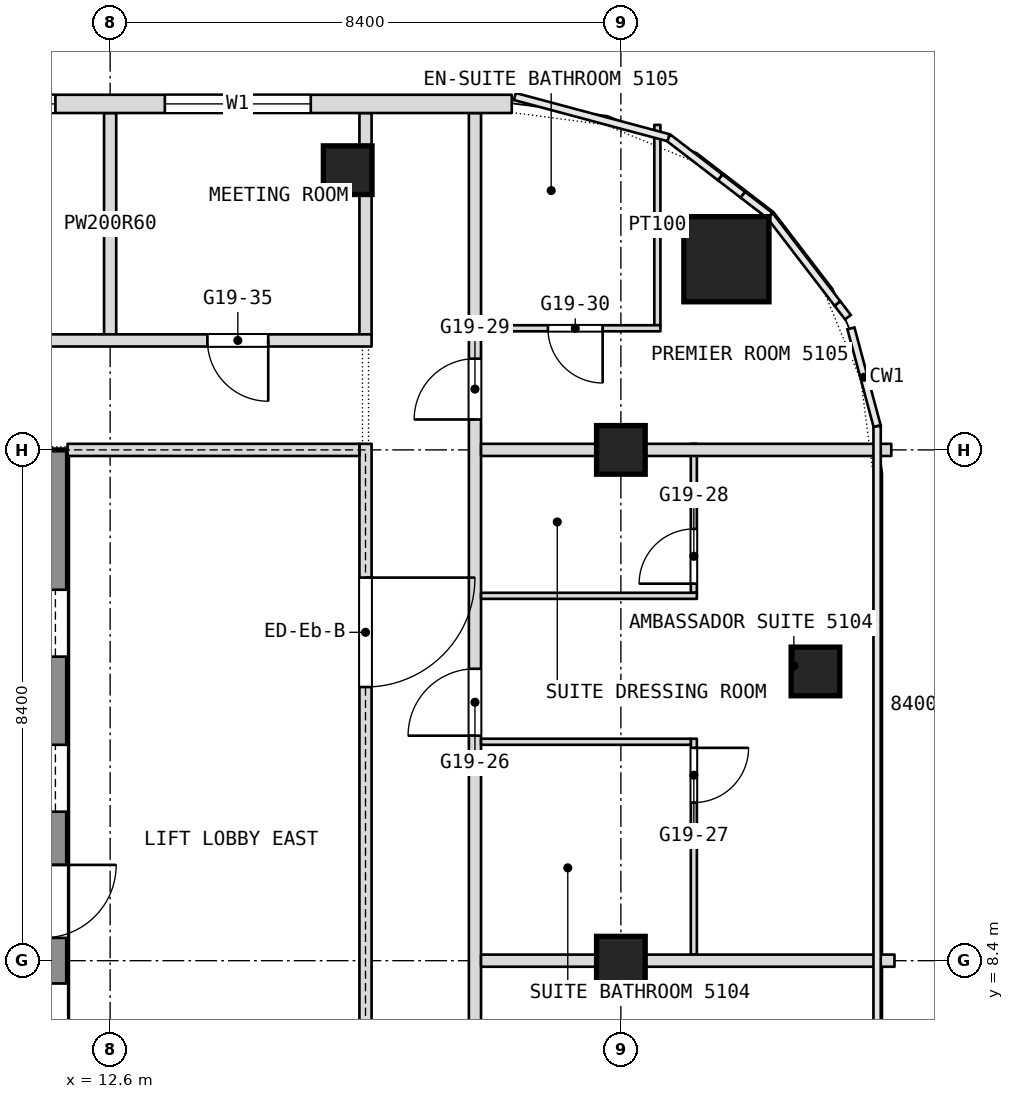
"""IFC4 building model, lengths in metres.
Left out: names, types, materials, properties, quantities, classifications, styles, units other than length and angle.
Written with IfcOpenShell. Run it as: python <this file> out.ifc"""

import sys

from ifc_helpers import new_model, si_unit, direction, frame, frame_2d, origin, origin_2d, place, context, subcontext, project, spatial, rectangle, extrude, element, fill, save


model = new_model("IFC4")
c1 = context("Model", 3, precision=1e-05, world=origin(), true_north=direction((0.0, 1.0)))
c2 = subcontext(c1, "Body", "Model", "MODEL_VIEW")
j1 = project(units=[si_unit("LENGTHUNIT", "METRE"), si_unit("PLANEANGLEUNIT", "RADIAN")], contexts=[c1])
p1 = place(None, origin())
s1 = spatial("IfcSite", under=j1, at=p1, CompositionType="ELEMENT")
p2 = place(p1, origin())
s2 = spatial("IfcBuilding", under=s1, at=p2, CompositionType="ELEMENT")
p3 = place(p2, frame((0.0, 0.0, 220.1)))
s3 = spatial("IfcBuildingStorey", under=s2, at=p3, CompositionType="ELEMENT", Elevation=220.1)
p4 = place(p3, frame((11.5, 0.0, 0.0), z_axis=(0.0, 0.0, 1.0), x_axis=(0.0, 1.0, 0.0)))
e1 = element("IfcWall", 1, at=p4, inside=s3, PredefinedType="SHEAR", context=c2, shape_type="SweptSolid", body=[
    extrude(rectangle(XDim=16.8, YDim=0.8, at=frame_2d((8.4, 0.0))), origin(), (0.0, 0.0, 1.0), 3.6),
])
p5 = place(p4, frame((2.3, 0.0, 0.0)))
e2 = element("IfcOpeningElement", 2, at=p5, cuts=e1, PredefinedType="OPENING", context=c2, shape_type="SweptSolid", body=[
    extrude(rectangle(XDim=1.1, YDim=2.1, at=frame_2d((0.55, 1.05))), frame((0.0, 0.4, 0.0), z_axis=(0.0, -1.0, 0.0), x_axis=(1.0, 0.0, 0.0)), (0.0, 0.0, 1.0), 0.8),
])
p6 = place(p4, frame((4.85, 0.0, 0.0)))
e3 = element("IfcOpeningElement", 3, at=p6, cuts=e1, PredefinedType="OPENING", context=c2, shape_type="SweptSolid", body=[
    extrude(rectangle(XDim=1.1, YDim=2.1, at=frame_2d((0.55, 1.05))), frame((0.0, 0.4, 0.0), z_axis=(0.0, -1.0, 0.0), x_axis=(1.0, 0.0, 0.0)), (0.0, 0.0, 1.0), 0.8),
])
p7 = place(p4, frame((6.825, 0.0, 0.0)))
e4 = element("IfcOpeningElement", 4, at=p7, cuts=e1, PredefinedType="OPENING", context=c2, shape_type="SweptSolid", body=[
    extrude(rectangle(XDim=1.2, YDim=2.1, at=frame_2d((0.6, 1.05))), frame((0.0, 0.4, 0.0), z_axis=(0.0, -1.0, 0.0), x_axis=(1.0, 0.0, 0.0)), (0.0, 0.0, 1.0), 0.8),
])
p8 = place(p4, frame((13.4, 0.0, 0.0)))
e5 = element("IfcOpeningElement", 5, at=p8, cuts=e1, PredefinedType="OPENING", context=c2, shape_type="SweptSolid", body=[
    extrude(rectangle(XDim=1.1, YDim=2.1, at=frame_2d((0.55, 1.05))), frame((0.0, 0.4, 0.0), z_axis=(0.0, -1.0, 0.0), x_axis=(1.0, 0.0, 0.0)), (0.0, 0.0, 1.0), 0.8),
])
p9 = place(p4, frame((10.85, 0.0, 0.0)))
e6 = element("IfcOpeningElement", 6, at=p9, cuts=e1, PredefinedType="OPENING", context=c2, shape_type="SweptSolid", body=[
    extrude(rectangle(XDim=1.1, YDim=2.1, at=frame_2d((0.55, 1.05))), frame((0.0, 0.4, 0.0), z_axis=(0.0, -1.0, 0.0), x_axis=(1.0, 0.0, 0.0)), (0.0, 0.0, 1.0), 0.8),
])
p10 = place(p4, frame((8.775, 0.0, 0.0)))
e7 = element("IfcOpeningElement", 7, at=p10, cuts=e1, PredefinedType="OPENING", context=c2, shape_type="SweptSolid", body=[
    extrude(rectangle(XDim=1.2, YDim=2.1, at=frame_2d((0.6, 1.05))), frame((0.0, 0.4, 0.0), z_axis=(0.0, -1.0, 0.0), x_axis=(1.0, 0.0, 0.0)), (0.0, 0.0, 1.0), 0.8),
])
p11 = place(p3, frame((22.736, 19.936, 0.0), z_axis=(0.0, 0.0, 1.0), x_axis=(1.0, 0.0, 0.0)))
e8 = element("IfcColumn", 8, at=p11, inside=s3, PredefinedType="COLUMN", context=c2, shape_type="SweptSolid", body=[
    extrude(rectangle(XDim=1.4, YDim=1.4, at=origin_2d()), origin(), (0.0, 0.0, 1.0), 3.6),
])
for number, where, z_axis, x_axis in (
    (9, (21.0, 8.4, 0.0), (0.0, 0.0, 1.0), (1.0, 0.0, 0.0)),
    (10, (21.0, 16.8, 0.0), (0.0, 0.0, 1.0), (1.0, 0.0, 0.0)),
    (11, (16.507, 21.4, 0.0), (0.0, 0.0, 1.0), (1.0, 0.0, 0.0)),
    (12, (24.2, 13.156, 0.0), (0.0, 0.0, 1.0), (1.0, 0.0, 0.0)),
):
    element("IfcColumn", number, at=place(p3, frame(where, z_axis=z_axis, x_axis=x_axis)), inside=s3, PredefinedType="COLUMN", context=c2, shape_type="SweptSolid", body=[
        extrude(rectangle(XDim=0.8, YDim=0.8, at=origin_2d()), origin(), (0.0, 0.0, 1.0), 3.6),
    ])
p12 = place(p3, frame((22.2, 8.5, 0.0), z_axis=(0.0, 0.0, 1.0), x_axis=(0.0, 1.0, 0.0)))
e13 = element("IfcWall", 13, at=p12, inside=s3, PredefinedType="PARTITIONING", context=c2, shape_type="SweptSolid", body=[
    extrude(rectangle(XDim=3.55, YDim=0.1, at=frame_2d((1.775, 0.0))), origin(), (0.0, 0.0, 1.0), 3.34),
])
p13 = place(p12, frame((2.5, 0.0, 0.0)))
e14 = element("IfcOpeningElement", 14, at=p13, cuts=e13, PredefinedType="OPENING", context=c2, shape_type="SweptSolid", body=[
    extrude(rectangle(XDim=0.9, YDim=2.1, at=frame_2d((0.45, 1.05))), frame((0.0, 0.05, 0.0), z_axis=(0.0, -1.0, 0.0), x_axis=(1.0, 0.0, 0.0)), (0.0, 0.0, 1.0), 0.1),
])
p14 = place(p3, frame((22.2, 14.45, 0.0), z_axis=(0.0, 0.0, 1.0), x_axis=(0.0, 1.0, 0.0)))
e15 = element("IfcWall", 15, at=p14, inside=s3, PredefinedType="PARTITIONING", context=c2, shape_type="SweptSolid", body=[
    extrude(rectangle(XDim=2.45, YDim=0.1, at=frame_2d((1.225, 0.0))), origin(), (0.0, 0.0, 1.0), 3.34),
])
p15 = place(p14, frame((0.15, 0.0, 0.0)))
e16 = element("IfcOpeningElement", 16, at=p15, cuts=e15, PredefinedType="OPENING", context=c2, shape_type="SweptSolid", body=[
    extrude(rectangle(XDim=0.9, YDim=2.1, at=frame_2d((0.45, 1.05))), frame((0.0, 0.05, 0.0), z_axis=(0.0, -1.0, 0.0), x_axis=(1.0, 0.0, 0.0)), (0.0, 0.0, 1.0), 0.1),
])
p16 = place(p3, frame((21.6, 18.85, 0.0), z_axis=(0.0, 0.0, 1.0), x_axis=(0.0, 1.0, 0.0)))
e17 = element("IfcWall", 17, at=p16, inside=s3, PredefinedType="PARTITIONING", context=c2, shape_type="SweptSolid", body=[
    extrude(rectangle(XDim=3.295, YDim=0.1, at=frame_2d((1.647, 0.0))), origin(), (0.0, 0.0, 1.0), 3.34),
])
p17 = place(p3, frame((18.6, -26.751, 0.0), z_axis=(0.0, 0.0, 1.0), x_axis=(0.0, 1.0, 0.0)))
e18 = element("IfcWall", 18, at=p17, inside=s3, PredefinedType="PARTITIONING", context=c2, shape_type="SweptSolid", body=[
    extrude(rectangle(XDim=49.091, YDim=0.2, at=frame_2d((24.545, 0.0))), origin(), (0.0, 0.0, 1.0), 3.34),
])
p18 = place(p17, frame((4.226, 0.0, 0.0)))
e19 = element("IfcOpeningElement", 19, at=p18, cuts=e18, PredefinedType="OPENING", context=c2, shape_type="SweptSolid", body=[
    extrude(rectangle(XDim=1.8, YDim=2.1, at=frame_2d((0.9, 1.05))), frame((0.0, 0.1, 0.0), z_axis=(0.0, -1.0, 0.0), x_axis=(1.0, 0.0, 0.0)), (0.0, 0.0, 1.0), 0.2),
])
p19 = place(p17, frame((10.351, 0.0, 0.0)))
e20 = element("IfcOpeningElement", 20, at=p19, cuts=e18, PredefinedType="OPENING", context=c2, shape_type="SweptSolid", body=[
    extrude(rectangle(XDim=1.0, YDim=2.1, at=frame_2d((0.5, 1.05))), frame((0.0, 0.1, 0.0), z_axis=(0.0, -1.0, 0.0), x_axis=(1.0, 0.0, 0.0)), (0.0, 0.0, 1.0), 0.2),
])
p20 = place(p17, frame((16.951, 0.0, 0.0)))
e21 = element("IfcOpeningElement", 21, at=p20, cuts=e18, PredefinedType="OPENING", context=c2, shape_type="SweptSolid", body=[
    extrude(rectangle(XDim=1.0, YDim=2.1, at=frame_2d((0.5, 1.05))), frame((0.0, 0.1, 0.0), z_axis=(0.0, -1.0, 0.0), x_axis=(1.0, 0.0, 0.0)), (0.0, 0.0, 1.0), 0.2),
])
p21 = place(p17, frame((22.051, 0.0, 0.0)))
e22 = element("IfcOpeningElement", 22, at=p21, cuts=e18, PredefinedType="OPENING", context=c2, shape_type="SweptSolid", body=[
    extrude(rectangle(XDim=1.1, YDim=2.1, at=frame_2d((0.55, 1.05))), frame((0.0, 0.1, 0.0), z_axis=(0.0, -1.0, 0.0), x_axis=(1.0, 0.0, 0.0)), (0.0, 0.0, 1.0), 0.2),
])
p22 = place(p17, frame((30.051, 0.0, 0.0)))
e23 = element("IfcOpeningElement", 23, at=p22, cuts=e18, PredefinedType="OPENING", context=c2, shape_type="SweptSolid", body=[
    extrude(rectangle(XDim=1.8, YDim=2.1, at=frame_2d((0.9, 1.05))), frame((0.0, 0.1, 0.0), z_axis=(0.0, -1.0, 0.0), x_axis=(1.0, 0.0, 0.0)), (0.0, 0.0, 1.0), 0.2),
])
p23 = place(p17, frame((38.851, 0.0, 0.0)))
e24 = element("IfcOpeningElement", 24, at=p23, cuts=e18, PredefinedType="OPENING", context=c2, shape_type="SweptSolid", body=[
    extrude(rectangle(XDim=1.1, YDim=2.1, at=frame_2d((0.55, 1.05))), frame((0.0, 0.1, 0.0), z_axis=(0.0, -1.0, 0.0), x_axis=(1.0, 0.0, 0.0)), (0.0, 0.0, 1.0), 0.2),
])
p24 = place(p17, frame((44.051, 0.0, 0.0)))
e25 = element("IfcOpeningElement", 25, at=p24, cuts=e18, PredefinedType="OPENING", context=c2, shape_type="SweptSolid", body=[
    extrude(rectangle(XDim=1.0, YDim=2.1, at=frame_2d((0.5, 1.05))), frame((0.0, 0.1, 0.0), z_axis=(0.0, -1.0, 0.0), x_axis=(1.0, 0.0, 0.0)), (0.0, 0.0, 1.0), 0.2),
])
for number, where, z_axis, x_axis in (
    (26, (16.8, 18.7, 0.0), (0.0, 0.0, 1.0), (0.0, 1.0, 0.0)),
    (27, (12.6, 18.7, 0.0), (0.0, 0.0, 1.0), (0.0, 1.0, 0.0)),
):
    element("IfcWall", number, at=place(p3, frame(where, z_axis=z_axis, x_axis=x_axis)), inside=s3, PredefinedType="PARTITIONING", context=c2, shape_type="SweptSolid", body=[
        extrude(rectangle(XDim=3.64, YDim=0.2, at=frame_2d((1.82, 0.0))), origin(), (0.0, 0.0, 1.0), 3.34),
    ])
p25 = place(p3, frame((18.7, 8.4, 0.0), z_axis=(0.0, 0.0, 1.0), x_axis=(1.0, 0.0, 0.0)))
e28 = element("IfcWall", 28, at=p25, inside=s3, PredefinedType="PARTITIONING", context=c2, shape_type="SweptSolid", body=[
    extrude(rectangle(XDim=6.8, YDim=0.2, at=frame_2d((3.4, 0.0))), origin(), (0.0, 0.0, 1.0), 2.94),
])
p26 = place(p3, frame((18.7, 12.0, 0.0), z_axis=(0.0, 0.0, 1.0), x_axis=(1.0, 0.0, 0.0)))
e29 = element("IfcWall", 29, at=p26, inside=s3, PredefinedType="PARTITIONING", context=c2, shape_type="SweptSolid", body=[
    extrude(rectangle(XDim=3.45, YDim=0.1, at=frame_2d((1.725, 0.0))), origin(), (0.0, 0.0, 1.0), 3.34),
])
p27 = place(p3, frame((18.7, 14.4, 0.0), z_axis=(0.0, 0.0, 1.0), x_axis=(1.0, 0.0, 0.0)))
e30 = element("IfcWall", 30, at=p27, inside=s3, PredefinedType="PARTITIONING", context=c2, shape_type="SweptSolid", body=[
    extrude(rectangle(XDim=3.55, YDim=0.1, at=frame_2d((1.775, 0.0))), origin(), (0.0, 0.0, 1.0), 3.34),
])
p28 = place(p3, frame((18.7, 16.8, 0.0), z_axis=(0.0, 0.0, 1.0), x_axis=(1.0, 0.0, 0.0)))
e31 = element("IfcWall", 31, at=p28, inside=s3, PredefinedType="PARTITIONING", context=c2, shape_type="SweptSolid", body=[
    extrude(rectangle(XDim=6.747, YDim=0.2, at=frame_2d((3.374, 0.0))), origin(), (0.0, 0.0, 1.0), 2.94),
])
p29 = place(p3, frame((-16.9, 18.6, 0.0), z_axis=(0.0, 0.0, 1.0), x_axis=(1.0, 0.0, 0.0)))
e32 = element("IfcWall", 32, at=p29, inside=s3, PredefinedType="PARTITIONING", context=c2, shape_type="SweptSolid", body=[
    extrude(rectangle(XDim=33.8, YDim=0.2, at=frame_2d((16.9, 0.0))), origin(), (0.0, 0.0, 1.0), 3.34),
])
p30 = place(p29, frame((1.7, 0.0, 0.0)))
e33 = element("IfcOpeningElement", 33, at=p30, cuts=e32, PredefinedType="OPENING", context=c2, shape_type="SweptSolid", body=[
    extrude(rectangle(XDim=1.0, YDim=2.1, at=frame_2d((0.5, 1.05))), frame((0.0, 0.1, 0.0), z_axis=(0.0, -1.0, 0.0), x_axis=(1.0, 0.0, 0.0)), (0.0, 0.0, 1.0), 0.2),
])
p31 = place(p29, frame((7.6, 0.0, 0.0)))
e34 = element("IfcOpeningElement", 34, at=p31, cuts=e32, PredefinedType="OPENING", context=c2, shape_type="SweptSolid", body=[
    extrude(rectangle(XDim=1.8, YDim=2.1, at=frame_2d((0.9, 1.05))), frame((0.0, 0.1, 0.0), z_axis=(0.0, -1.0, 0.0), x_axis=(1.0, 0.0, 0.0)), (0.0, 0.0, 1.0), 0.2),
])
p32 = place(p29, frame((16.0, 0.0, 0.0)))
e35 = element("IfcOpeningElement", 35, at=p32, cuts=e32, PredefinedType="OPENING", context=c2, shape_type="SweptSolid", body=[
    extrude(rectangle(XDim=1.8, YDim=2.1, at=frame_2d((0.9, 1.05))), frame((0.0, 0.1, 0.0), z_axis=(0.0, -1.0, 0.0), x_axis=(1.0, 0.0, 0.0)), (0.0, 0.0, 1.0), 0.2),
])
p33 = place(p29, frame((24.4, 0.0, 0.0)))
e36 = element("IfcOpeningElement", 36, at=p33, cuts=e32, PredefinedType="OPENING", context=c2, shape_type="SweptSolid", body=[
    extrude(rectangle(XDim=1.8, YDim=2.1, at=frame_2d((0.9, 1.05))), frame((0.0, 0.1, 0.0), z_axis=(0.0, -1.0, 0.0), x_axis=(1.0, 0.0, 0.0)), (0.0, 0.0, 1.0), 0.2),
])
p34 = place(p29, frame((31.1, 0.0, 0.0)))
e37 = element("IfcOpeningElement", 37, at=p34, cuts=e32, PredefinedType="OPENING", context=c2, shape_type="SweptSolid", body=[
    extrude(rectangle(XDim=1.0, YDim=2.1, at=frame_2d((0.5, 1.05))), frame((0.0, 0.1, 0.0), z_axis=(0.0, -1.0, 0.0), x_axis=(1.0, 0.0, 0.0)), (0.0, 0.0, 1.0), 0.2),
])
p35 = place(p3, frame((18.7, 18.8, 0.0), z_axis=(0.0, 0.0, 1.0), x_axis=(1.0, 0.0, 0.0)))
e38 = element("IfcWall", 38, at=p35, inside=s3, PredefinedType="PARTITIONING", context=c2, shape_type="SweptSolid", body=[
    extrude(rectangle(XDim=2.95, YDim=0.1, at=frame_2d((1.475, 0.0))), origin(), (0.0, 0.0, 1.0), 3.34),
])
p36 = place(p35, frame((1.1, 0.0, 0.0)))
e39 = element("IfcOpeningElement", 39, at=p36, cuts=e38, PredefinedType="OPENING", context=c2, shape_type="SweptSolid", body=[
    extrude(rectangle(XDim=0.9, YDim=2.1, at=frame_2d((0.45, 1.05))), frame((0.0, 0.05, 0.0), z_axis=(0.0, -1.0, 0.0), x_axis=(1.0, 0.0, 0.0)), (0.0, 0.0, 1.0), 0.1),
])
p37 = place(p3, frame((19.206, 22.49, 0.0), z_axis=(0.0, 0.0, 1.0), x_axis=(-1.0, 0.0, 0.0)))
e40 = element("IfcWall", 40, at=p37, inside=s3, PredefinedType="NOTDEFINED", context=c2, shape_type="SweptSolid", body=[
    extrude(rectangle(XDim=38.412, YDim=0.3, at=frame_2d((19.206, 0.0))), origin(), (0.0, 0.0, 1.0), 3.6),
])
p38 = place(p37, frame((3.306, 0.0, 0.9)))
e41 = element("IfcOpeningElement", 41, at=p38, cuts=e40, PredefinedType="OPENING", context=c2, shape_type="SweptSolid", body=[
    extrude(rectangle(XDim=2.4, YDim=2.1, at=frame_2d((1.2, 1.05))), frame((0.0, 0.15, 0.0), z_axis=(0.0, -1.0, 0.0), x_axis=(1.0, 0.0, 0.0)), (0.0, 0.0, 1.0), 0.3),
])
p39 = place(p37, frame((7.506, 0.0, 0.9)))
e42 = element("IfcOpeningElement", 42, at=p39, cuts=e40, PredefinedType="OPENING", context=c2, shape_type="SweptSolid", body=[
    extrude(rectangle(XDim=2.4, YDim=2.1, at=frame_2d((1.2, 1.05))), frame((0.0, 0.15, 0.0), z_axis=(0.0, -1.0, 0.0), x_axis=(1.0, 0.0, 0.0)), (0.0, 0.0, 1.0), 0.3),
])
p40 = place(p37, frame((11.706, 0.0, 0.9)))
e43 = element("IfcOpeningElement", 43, at=p40, cuts=e40, PredefinedType="OPENING", context=c2, shape_type="SweptSolid", body=[
    extrude(rectangle(XDim=2.4, YDim=2.1, at=frame_2d((1.2, 1.05))), frame((0.0, 0.15, 0.0), z_axis=(0.0, -1.0, 0.0), x_axis=(1.0, 0.0, 0.0)), (0.0, 0.0, 1.0), 0.3),
])
p41 = place(p37, frame((15.906, 0.0, 0.9)))
e44 = element("IfcOpeningElement", 44, at=p41, cuts=e40, PredefinedType="OPENING", context=c2, shape_type="SweptSolid", body=[
    extrude(rectangle(XDim=2.4, YDim=2.1, at=frame_2d((1.2, 1.05))), frame((0.0, 0.15, 0.0), z_axis=(0.0, -1.0, 0.0), x_axis=(1.0, 0.0, 0.0)), (0.0, 0.0, 1.0), 0.3),
])
p42 = place(p37, frame((20.106, 0.0, 0.9)))
e45 = element("IfcOpeningElement", 45, at=p42, cuts=e40, PredefinedType="OPENING", context=c2, shape_type="SweptSolid", body=[
    extrude(rectangle(XDim=2.4, YDim=2.1, at=frame_2d((1.2, 1.05))), frame((0.0, 0.15, 0.0), z_axis=(0.0, -1.0, 0.0), x_axis=(1.0, 0.0, 0.0)), (0.0, 0.0, 1.0), 0.3),
])
p43 = place(p37, frame((24.306, 0.0, 0.9)))
e46 = element("IfcOpeningElement", 46, at=p43, cuts=e40, PredefinedType="OPENING", context=c2, shape_type="SweptSolid", body=[
    extrude(rectangle(XDim=2.4, YDim=2.1, at=frame_2d((1.2, 1.05))), frame((0.0, 0.15, 0.0), z_axis=(0.0, -1.0, 0.0), x_axis=(1.0, 0.0, 0.0)), (0.0, 0.0, 1.0), 0.3),
])
p44 = place(p37, frame((28.506, 0.0, 0.9)))
e47 = element("IfcOpeningElement", 47, at=p44, cuts=e40, PredefinedType="OPENING", context=c2, shape_type="SweptSolid", body=[
    extrude(rectangle(XDim=2.4, YDim=2.1, at=frame_2d((1.2, 1.05))), frame((0.0, 0.15, 0.0), z_axis=(0.0, -1.0, 0.0), x_axis=(1.0, 0.0, 0.0)), (0.0, 0.0, 1.0), 0.3),
])
p45 = place(p37, frame((32.706, 0.0, 0.9)))
e48 = element("IfcOpeningElement", 48, at=p45, cuts=e40, PredefinedType="OPENING", context=c2, shape_type="SweptSolid", body=[
    extrude(rectangle(XDim=2.4, YDim=2.1, at=frame_2d((1.2, 1.05))), frame((0.0, 0.15, 0.0), z_axis=(0.0, -1.0, 0.0), x_axis=(1.0, 0.0, 0.0)), (0.0, 0.0, 1.0), 0.3),
])
p46 = place(p3, frame((16.8, -0.1, 0.0), z_axis=(0.0, 0.0, 1.0), x_axis=(0.0, 1.0, 0.0)))
e49 = element("IfcWall", 49, at=p46, inside=s3, PredefinedType="PARTITIONING", context=c2, shape_type="SweptSolid", body=[
    extrude(rectangle(XDim=17.0, YDim=0.2, at=frame_2d((8.5, 0.0))), origin(), (0.0, 0.0, 1.0), 3.34),
])
p47 = place(p46, frame((2.2, 0.0, 0.0)))
e50 = element("IfcOpeningElement", 50, at=p47, cuts=e49, PredefinedType="OPENING", context=c2, shape_type="SweptSolid", body=[
    extrude(rectangle(XDim=1.8, YDim=2.1, at=frame_2d((0.9, 1.05))), frame((0.0, 0.1, 0.0), z_axis=(0.0, -1.0, 0.0), x_axis=(1.0, 0.0, 0.0)), (0.0, 0.0, 1.0), 0.2),
])
p48 = place(p46, frame((13.0, 0.0, 0.0)))
e51 = element("IfcOpeningElement", 51, at=p48, cuts=e49, PredefinedType="OPENING", context=c2, shape_type="SweptSolid", body=[
    extrude(rectangle(XDim=1.8, YDim=2.1, at=frame_2d((0.9, 1.05))), frame((0.0, 0.1, 0.0), z_axis=(0.0, -1.0, 0.0), x_axis=(1.0, 0.0, 0.0)), (0.0, 0.0, 1.0), 0.2),
])
p49 = place(p3, frame((11.9, 16.8, 0.0), z_axis=(0.0, 0.0, 1.0), x_axis=(1.0, 0.0, 0.0)))
e52 = element("IfcWall", 52, at=p49, inside=s3, PredefinedType="PARTITIONING", context=c2, shape_type="SweptSolid", body=[
    extrude(rectangle(XDim=4.8, YDim=0.2, at=frame_2d((2.4, 0.0))), origin(), (0.0, 0.0, 1.0), 2.94),
])
p50 = place(p13, origin())
e53 = element("IfcDoor", 53, at=p50, inside=s3, OperationType="SINGLE_SWING_RIGHT", PredefinedType="DOOR", context=c2, shape_type="SweptSolid", body=[
    extrude(rectangle(XDim=0.9, YDim=2.1, at=frame_2d((0.45, 1.05))), frame((0.0, 0.025, 0.0), z_axis=(0.0, -1.0, 0.0), x_axis=(1.0, 0.0, 0.0)), (0.0, 0.0, 1.0), 0.05),
])
fill(e14, e53)
p51 = place(p15, origin())
e54 = element("IfcDoor", 54, at=p51, inside=s3, OperationType="SINGLE_SWING_LEFT", PredefinedType="DOOR", context=c2, shape_type="SweptSolid", body=[
    extrude(rectangle(XDim=0.9, YDim=2.1, at=frame_2d((0.45, 1.05))), frame((0.0, 0.025, 0.0), z_axis=(0.0, -1.0, 0.0), x_axis=(1.0, 0.0, 0.0)), (0.0, 0.0, 1.0), 0.05),
])
fill(e16, e54)
p52 = place(p23, origin())
e55 = element("IfcDoor", 55, at=p52, inside=s3, OperationType="SINGLE_SWING_RIGHT", PredefinedType="DOOR", context=c2, shape_type="SweptSolid", body=[
    extrude(rectangle(XDim=1.1, YDim=2.1, at=frame_2d((0.55, 1.05))), frame((0.0, 0.025, 0.0), z_axis=(0.0, -1.0, 0.0), x_axis=(1.0, 0.0, 0.0)), (0.0, 0.0, 1.0), 0.05),
])
fill(e24, e55)
p53 = place(p24, origin())
e56 = element("IfcDoor", 56, at=p53, inside=s3, OperationType="SINGLE_SWING_LEFT", PredefinedType="DOOR", context=c2, shape_type="SweptSolid", body=[
    extrude(rectangle(XDim=1.0, YDim=2.1, at=frame_2d((0.5, 1.05))), frame((0.0, 0.025, 0.0), z_axis=(0.0, -1.0, 0.0), x_axis=(1.0, 0.0, 0.0)), (0.0, 0.0, 1.0), 0.05),
])
fill(e25, e56)
p54 = place(p34, origin())
e57 = element("IfcDoor", 57, at=p54, inside=s3, OperationType="SINGLE_SWING_LEFT", PredefinedType="DOOR", context=c2, shape_type="SweptSolid", body=[
    extrude(rectangle(XDim=1.0, YDim=2.1, at=frame_2d((0.5, 1.05))), frame((0.0, 0.025, 0.0), z_axis=(0.0, -1.0, 0.0), x_axis=(1.0, 0.0, 0.0)), (0.0, 0.0, 1.0), 0.05),
])
fill(e37, e57)
p55 = place(p36, origin())
e58 = element("IfcDoor", 58, at=p55, inside=s3, OperationType="SINGLE_SWING_RIGHT", PredefinedType="DOOR", context=c2, shape_type="SweptSolid", body=[
    extrude(rectangle(XDim=0.9, YDim=2.1, at=frame_2d((0.45, 1.05))), frame((0.0, 0.025, 0.0), z_axis=(0.0, -1.0, 0.0), x_axis=(1.0, 0.0, 0.0)), (0.0, 0.0, 1.0), 0.05),
])
fill(e39, e58)
p56 = place(p38, origin())
e59 = element("IfcWindow", 59, at=p56, inside=s3, PartitioningType="SINGLE_PANEL", PredefinedType="WINDOW", context=c2, shape_type="SweptSolid", body=[
    extrude(rectangle(XDim=2.4, YDim=2.1, at=frame_2d((1.2, 1.05))), frame((0.0, 0.03, 0.0), z_axis=(0.0, -1.0, 0.0), x_axis=(1.0, 0.0, 0.0)), (0.0, 0.0, 1.0), 0.06),
])
fill(e41, e59)
p57 = place(p39, origin())
e60 = element("IfcWindow", 60, at=p57, inside=s3, PartitioningType="SINGLE_PANEL", PredefinedType="WINDOW", context=c2, shape_type="SweptSolid", body=[
    extrude(rectangle(XDim=2.4, YDim=2.1, at=frame_2d((1.2, 1.05))), frame((0.0, 0.03, 0.0), z_axis=(0.0, -1.0, 0.0), x_axis=(1.0, 0.0, 0.0)), (0.0, 0.0, 1.0), 0.06),
])
fill(e42, e60)
p58 = place(p48, origin())
e61 = element("IfcDoor", 61, at=p58, inside=s3, OperationType="DOUBLE_DOOR_SINGLE_SWING", PredefinedType="DOOR", context=c2, shape_type="SweptSolid", body=[
    extrude(rectangle(XDim=1.8, YDim=2.1, at=frame_2d((0.9, 1.05))), frame((0.0, 0.025, 0.0), z_axis=(0.0, -1.0, 0.0), x_axis=(1.0, 0.0, 0.0)), (0.0, 0.0, 1.0), 0.05),
])
fill(e51, e61)
save(model, sys.argv[1])
